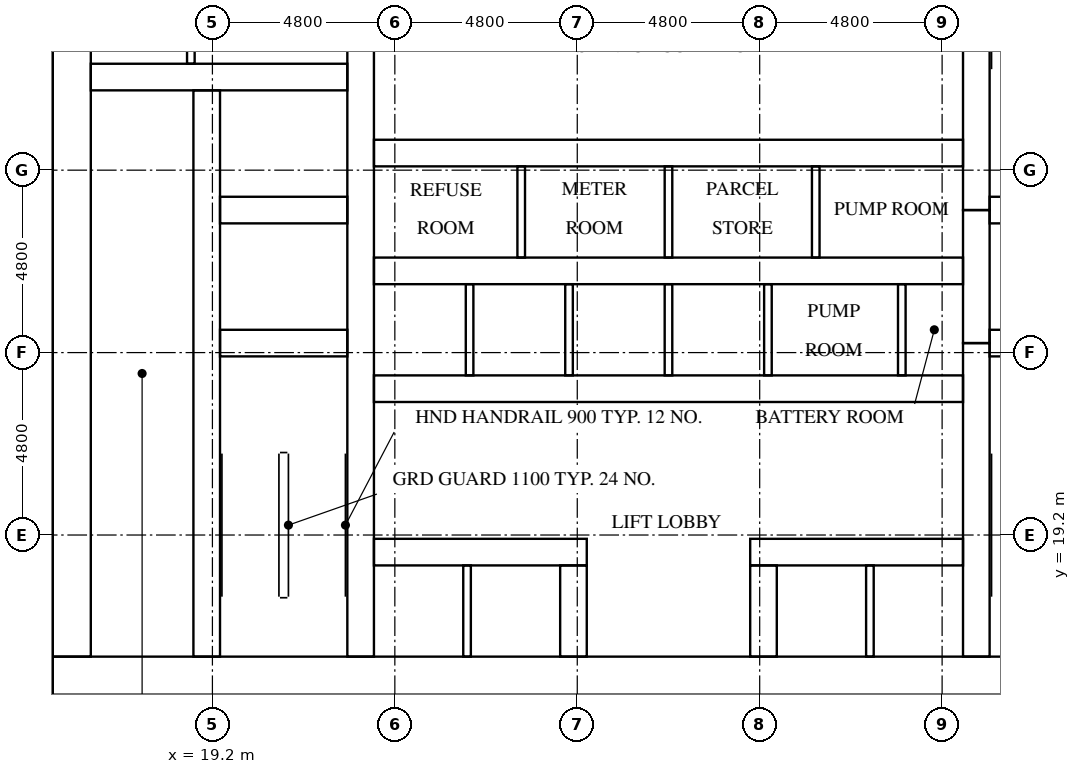
"""IFC4 building model, lengths in metres.
Left out: names, types, materials, properties, quantities, classifications, styles, units other than length and angle.
Written with IfcOpenShell. Run it as: python <this file> out.ifc"""

import sys

from ifc_helpers import new_model, si_unit, direction, frame, frame_2d, origin, place, context, subcontext, project, spatial, rectangle, extrude, element, fill, save


model = new_model("IFC4")
c1 = context("Model", 3, precision=1e-05, world=origin(), true_north=direction((0.0, 1.0)))
c2 = subcontext(c1, "Body", "Model", "MODEL_VIEW")
j1 = project(units=[si_unit("LENGTHUNIT", "METRE"), si_unit("PLANEANGLEUNIT", "RADIAN")], contexts=[c1])
p1 = place(None, origin())
s1 = spatial("IfcSite", under=j1, at=p1, CompositionType="ELEMENT")
p2 = place(p1, origin())
s2 = spatial("IfcBuilding", under=s1, at=p2, CompositionType="ELEMENT")
p3 = place(p2, frame((0.0, 0.0, 10.5)))
s3 = spatial("IfcBuildingStorey", under=s2, at=p3, CompositionType="ELEMENT", Elevation=10.5)
p4 = place(p3, frame((15.0, 15.5, 0.0), z_axis=(0.0, 0.0, 1.0), x_axis=(1.0, 0.0, 0.0)))
e1 = element("IfcWall", 1, at=p4, inside=s3, PredefinedType="SHEAR", context=c2, shape_type="SweptSolid", body=[
    extrude(rectangle(XDim=32.4, YDim=1.0, at=frame_2d((16.2, 0.0))), origin(), (0.0, 0.0, 1.0), 4.2),
])
p5 = place(p4, frame((15.3, 0.0, 0.0)))
e2 = element("IfcOpeningElement", 2, at=p5, cuts=e1, PredefinedType="OPENING", context=c2, shape_type="SweptSolid", body=[
    extrude(rectangle(XDim=1.8, YDim=2.1, at=frame_2d((0.9, 1.05))), frame((0.0, 0.51, 0.0), z_axis=(0.0, -1.0, 0.0), x_axis=(1.0, 0.0, 0.0)), (0.0, 0.0, 1.0), 1.02),
])
p6 = place(p3, frame((15.5, 16.0, 0.0), z_axis=(0.0, 0.0, 1.0), x_axis=(0.0, 1.0, 0.0)))
e3 = element("IfcWall", 3, at=p6, inside=s3, PredefinedType="SHEAR", context=c2, shape_type="SweptSolid", body=[
    extrude(rectangle(XDim=20.8, YDim=1.0, at=frame_2d((10.4, 0.0))), origin(), (0.0, 0.0, 1.0), 4.2),
])
p7 = place(p6, frame((4.76, 0.0, 0.0)))
e4 = element("IfcOpeningElement", 4, at=p7, cuts=e3, PredefinedType="OPENING", context=c2, shape_type="SweptSolid", body=[
    extrude(rectangle(XDim=1.2, YDim=2.1, at=frame_2d((0.6, 1.05))), frame((0.0, 0.51, 0.0), z_axis=(0.0, -1.0, 0.0), x_axis=(1.0, 0.0, 0.0)), (0.0, 0.0, 1.0), 1.02),
])
p8 = place(p3, frame((19.05, 16.0, 0.0), z_axis=(0.0, 0.0, 1.0), x_axis=(0.0, 1.0, 0.0)))
e5 = element("IfcWall", 5, at=p8, inside=s3, PredefinedType="SHEAR", context=c2, shape_type="SweptSolid", body=[
    extrude(rectangle(XDim=14.9, YDim=0.7, at=frame_2d((7.45, 0.0))), origin(), (0.0, 0.0, 1.0), 4.2),
])
p9 = place(p8, frame((9.45, 0.0, 0.0)))
e6 = element("IfcOpeningElement", 6, at=p9, cuts=e5, PredefinedType="OPENING", context=c2, shape_type="SweptSolid", body=[
    extrude(rectangle(XDim=1.1, YDim=2.1, at=frame_2d((0.55, 1.05))), frame((0.0, 0.36, 0.0), z_axis=(0.0, -1.0, 0.0), x_axis=(1.0, 0.0, 0.0)), (0.0, 0.0, 1.0), 0.72),
])
p10 = place(p8, frame((12.95, 0.0, 0.0)))
e7 = element("IfcOpeningElement", 7, at=p10, cuts=e5, PredefinedType="OPENING", context=c2, shape_type="SweptSolid", body=[
    extrude(rectangle(XDim=1.1, YDim=2.1, at=frame_2d((0.55, 1.05))), frame((0.0, 0.36, 0.0), z_axis=(0.0, -1.0, 0.0), x_axis=(1.0, 0.0, 0.0)), (0.0, 0.0, 1.0), 0.72),
])
p11 = place(p8, frame((0.2, 0.0, 0.0)))
e8 = element("IfcOpeningElement", 8, at=p11, cuts=e5, PredefinedType="OPENING", context=c2, shape_type="SweptSolid", body=[
    extrude(rectangle(XDim=1.2, YDim=2.1, at=frame_2d((0.6, 1.05))), frame((0.0, 0.36, 0.0), z_axis=(0.0, -1.0, 0.0), x_axis=(1.0, 0.0, 0.0)), (0.0, 0.0, 1.0), 0.72),
])
p12 = place(p3, frame((23.1, 16.0, 0.0), z_axis=(0.0, 0.0, 1.0), x_axis=(0.0, 1.0, 0.0)))
e9 = element("IfcWall", 9, at=p12, inside=s3, PredefinedType="SHEAR", context=c2, shape_type="SweptSolid", body=[
    extrude(rectangle(XDim=20.8, YDim=0.7, at=frame_2d((10.4, 0.0))), origin(), (0.0, 0.0, 1.0), 4.2),
])
p13 = place(p3, frame((39.3, 16.0, 0.0), z_axis=(0.0, 0.0, 1.0), x_axis=(0.0, 1.0, 0.0)))
e10 = element("IfcWall", 10, at=p13, inside=s3, PredefinedType="SHEAR", context=c2, shape_type="SweptSolid", body=[
    extrude(rectangle(XDim=8.25, YDim=0.7, at=frame_2d((4.125, 0.0))), origin(), (0.0, 0.0, 1.0), 4.2),
])
p14 = place(p3, frame((39.3, 24.25, 0.0), z_axis=(0.0, 0.0, 1.0), x_axis=(0.0, 1.0, 0.0)))
e11 = element("IfcWall", 11, at=p14, inside=s3, PredefinedType="SHEAR", context=c2, shape_type="SweptSolid", body=[
    extrude(rectangle(XDim=3.5, YDim=0.7, at=frame_2d((1.75, 0.0))), origin(), (0.0, 0.0, 1.0), 4.2),
])
p15 = place(p3, frame((39.3, 27.75, 0.0), z_axis=(0.0, 0.0, 1.0), x_axis=(0.0, 1.0, 0.0)))
e12 = element("IfcWall", 12, at=p15, inside=s3, PredefinedType="SHEAR", context=c2, shape_type="SweptSolid", body=[
    extrude(rectangle(XDim=9.05, YDim=0.7, at=frame_2d((4.525, 0.0))), origin(), (0.0, 0.0, 1.0), 4.2),
])
for number, where, z_axis, x_axis in (
    (13, (19.4, 24.25, 0.0), (0.0, 0.0, 1.0), (1.0, 0.0, 0.0)),
    (14, (19.4, 27.75, 0.0), (0.0, 0.0, 1.0), (1.0, 0.0, 0.0)),
):
    element("IfcWall", number, at=place(p3, frame(where, z_axis=z_axis, x_axis=x_axis)), inside=s3, PredefinedType="SHEAR", context=c2, shape_type="SweptSolid", body=[
        extrude(rectangle(XDim=3.35, YDim=0.7, at=frame_2d((1.675, 0.0))), origin(), (0.0, 0.0, 1.0), 4.2),
    ])
p16 = place(p3, frame((16.0, 31.25, 0.0), z_axis=(0.0, 0.0, 1.0), x_axis=(1.0, 0.0, 0.0)))
e15 = element("IfcWall", 15, at=p16, inside=s3, PredefinedType="SHEAR", context=c2, shape_type="SweptSolid", body=[
    extrude(rectangle(XDim=6.75, YDim=0.7, at=frame_2d((3.375, 0.0))), origin(), (0.0, 0.0, 1.0), 4.2),
])
for number, where, z_axis, x_axis in (
    (16, (39.65, 24.25, 0.0), (0.0, 0.0, 1.0), (1.0, 0.0, 0.0)),
    (17, (39.65, 27.75, 0.0), (0.0, 0.0, 1.0), (1.0, 0.0, 0.0)),
):
    element("IfcWall", number, at=place(p3, frame(where, z_axis=z_axis, x_axis=x_axis)), inside=s3, PredefinedType="SHEAR", context=c2, shape_type="SweptSolid", body=[
        extrude(rectangle(XDim=3.35, YDim=0.7, at=frame_2d((1.675, 0.0))), origin(), (0.0, 0.0, 1.0), 4.2),
    ])
p17 = place(p3, frame((23.45, 18.75, 0.0), z_axis=(0.0, 0.0, 1.0), x_axis=(1.0, 0.0, 0.0)))
e18 = element("IfcWall", 18, at=p17, inside=s3, PredefinedType="SHEAR", context=c2, shape_type="SweptSolid", body=[
    extrude(rectangle(XDim=5.6, YDim=0.7, at=frame_2d((2.8, 0.0))), origin(), (0.0, 0.0, 1.0), 4.2),
])
p18 = place(p17, frame((0.625, 0.0, 0.0)))
e19 = element("IfcOpeningElement", 19, at=p18, cuts=e18, PredefinedType="OPENING", context=c2, shape_type="SweptSolid", body=[
    extrude(rectangle(XDim=1.1, YDim=2.1, at=frame_2d((0.55, 1.05))), frame((0.0, 0.36, 0.0), z_axis=(0.0, -1.0, 0.0), x_axis=(1.0, 0.0, 0.0)), (0.0, 0.0, 1.0), 0.72),
])
p19 = place(p17, frame((3.175, 0.0, 0.0)))
e20 = element("IfcOpeningElement", 20, at=p19, cuts=e18, PredefinedType="OPENING", context=c2, shape_type="SweptSolid", body=[
    extrude(rectangle(XDim=1.1, YDim=2.1, at=frame_2d((0.55, 1.05))), frame((0.0, 0.36, 0.0), z_axis=(0.0, -1.0, 0.0), x_axis=(1.0, 0.0, 0.0)), (0.0, 0.0, 1.0), 0.72),
])
p20 = place(p3, frame((33.35, 18.75, 0.0), z_axis=(0.0, 0.0, 1.0), x_axis=(1.0, 0.0, 0.0)))
e21 = element("IfcWall", 21, at=p20, inside=s3, PredefinedType="SHEAR", context=c2, shape_type="SweptSolid", body=[
    extrude(rectangle(XDim=5.6, YDim=0.7, at=frame_2d((2.8, 0.0))), origin(), (0.0, 0.0, 1.0), 4.2),
])
p21 = place(p20, frame((1.325, 0.0, 0.0)))
e22 = element("IfcOpeningElement", 22, at=p21, cuts=e21, PredefinedType="OPENING", context=c2, shape_type="SweptSolid", body=[
    extrude(rectangle(XDim=1.1, YDim=2.1, at=frame_2d((0.55, 1.05))), frame((0.0, 0.36, 0.0), z_axis=(0.0, -1.0, 0.0), x_axis=(1.0, 0.0, 0.0)), (0.0, 0.0, 1.0), 0.72),
])
p22 = place(p20, frame((3.875, 0.0, 0.0)))
e23 = element("IfcOpeningElement", 23, at=p22, cuts=e21, PredefinedType="OPENING", context=c2, shape_type="SweptSolid", body=[
    extrude(rectangle(XDim=1.1, YDim=2.1, at=frame_2d((0.55, 1.05))), frame((0.0, 0.36, 0.0), z_axis=(0.0, -1.0, 0.0), x_axis=(1.0, 0.0, 0.0)), (0.0, 0.0, 1.0), 0.72),
])
p23 = place(p3, frame((23.45, 23.05, 0.0), z_axis=(0.0, 0.0, 1.0), x_axis=(1.0, 0.0, 0.0)))
e24 = element("IfcWall", 24, at=p23, inside=s3, PredefinedType="SHEAR", context=c2, shape_type="SweptSolid", body=[
    extrude(rectangle(XDim=15.5, YDim=0.7, at=frame_2d((7.75, 0.0))), origin(), (0.0, 0.0, 1.0), 4.2),
])
p24 = place(p23, frame((0.658, 0.0, 0.0)))
e25 = element("IfcOpeningElement", 25, at=p24, cuts=e24, PredefinedType="OPENING", context=c2, shape_type="SweptSolid", body=[
    extrude(rectangle(XDim=1.1, YDim=2.1, at=frame_2d((0.55, 1.05))), frame((0.0, 0.36, 0.0), z_axis=(0.0, -1.0, 0.0), x_axis=(1.0, 0.0, 0.0)), (0.0, 0.0, 1.0), 0.72),
])
p25 = place(p23, frame((3.275, 0.0, 0.0)))
e26 = element("IfcOpeningElement", 26, at=p25, cuts=e24, PredefinedType="OPENING", context=c2, shape_type="SweptSolid", body=[
    extrude(rectangle(XDim=1.1, YDim=2.1, at=frame_2d((0.55, 1.05))), frame((0.0, 0.36, 0.0), z_axis=(0.0, -1.0, 0.0), x_axis=(1.0, 0.0, 0.0)), (0.0, 0.0, 1.0), 0.72),
])
p26 = place(p23, frame((11.628, 0.0, 0.0)))
e27 = element("IfcOpeningElement", 27, at=p26, cuts=e24, PredefinedType="OPENING", context=c2, shape_type="SweptSolid", body=[
    extrude(rectangle(XDim=1.0, YDim=2.1, at=frame_2d((0.5, 1.05))), frame((0.0, 0.36, 0.0), z_axis=(0.0, -1.0, 0.0), x_axis=(1.0, 0.0, 0.0)), (0.0, 0.0, 1.0), 0.72),
])
p27 = place(p23, frame((14.245, 0.0, 0.0)))
e28 = element("IfcOpeningElement", 28, at=p27, cuts=e24, PredefinedType="OPENING", context=c2, shape_type="SweptSolid", body=[
    extrude(rectangle(XDim=1.0, YDim=2.1, at=frame_2d((0.5, 1.05))), frame((0.0, 0.36, 0.0), z_axis=(0.0, -1.0, 0.0), x_axis=(1.0, 0.0, 0.0)), (0.0, 0.0, 1.0), 0.72),
])
p28 = place(p3, frame((23.45, 26.15, 0.0), z_axis=(0.0, 0.0, 1.0), x_axis=(1.0, 0.0, 0.0)))
e29 = element("IfcWall", 29, at=p28, inside=s3, PredefinedType="SHEAR", context=c2, shape_type="SweptSolid", body=[
    extrude(rectangle(XDim=15.5, YDim=0.7, at=frame_2d((7.75, 0.0))), origin(), (0.0, 0.0, 1.0), 4.2),
])
p29 = place(p3, frame((23.45, 29.25, 0.0), z_axis=(0.0, 0.0, 1.0), x_axis=(1.0, 0.0, 0.0)))
e30 = element("IfcWall", 30, at=p29, inside=s3, PredefinedType="SHEAR", context=c2, shape_type="SweptSolid", body=[
    extrude(rectangle(XDim=15.5, YDim=0.7, at=frame_2d((7.75, 0.0))), origin(), (0.0, 0.0, 1.0), 4.2),
])
p30 = place(p29, frame((1.387, 0.0, 0.0)))
e31 = element("IfcOpeningElement", 31, at=p30, cuts=e30, PredefinedType="OPENING", context=c2, shape_type="SweptSolid", body=[
    extrude(rectangle(XDim=1.0, YDim=2.1, at=frame_2d((0.5, 1.05))), frame((0.0, 0.36, 0.0), z_axis=(0.0, -1.0, 0.0), x_axis=(1.0, 0.0, 0.0)), (0.0, 0.0, 1.0), 0.72),
])
p31 = place(p29, frame((5.312, 0.0, 0.0)))
e32 = element("IfcOpeningElement", 32, at=p31, cuts=e30, PredefinedType="OPENING", context=c2, shape_type="SweptSolid", body=[
    extrude(rectangle(XDim=1.0, YDim=2.1, at=frame_2d((0.5, 1.05))), frame((0.0, 0.36, 0.0), z_axis=(0.0, -1.0, 0.0), x_axis=(1.0, 0.0, 0.0)), (0.0, 0.0, 1.0), 0.72),
])
p32 = place(p29, frame((9.188, 0.0, 0.0)))
e33 = element("IfcOpeningElement", 33, at=p32, cuts=e30, PredefinedType="OPENING", context=c2, shape_type="SweptSolid", body=[
    extrude(rectangle(XDim=1.0, YDim=2.1, at=frame_2d((0.5, 1.05))), frame((0.0, 0.36, 0.0), z_axis=(0.0, -1.0, 0.0), x_axis=(1.0, 0.0, 0.0)), (0.0, 0.0, 1.0), 0.72),
])
p33 = place(p29, frame((13.113, 0.0, 0.0)))
e34 = element("IfcOpeningElement", 34, at=p33, cuts=e30, PredefinedType="OPENING", context=c2, shape_type="SweptSolid", body=[
    extrude(rectangle(XDim=1.0, YDim=2.1, at=frame_2d((0.5, 1.05))), frame((0.0, 0.36, 0.0), z_axis=(0.0, -1.0, 0.0), x_axis=(1.0, 0.0, 0.0)), (0.0, 0.0, 1.0), 0.72),
])
for number, where, z_axis, x_axis in (
    (35, (28.7, 16.0, 0.0), (0.0, 0.0, 1.0), (0.0, 1.0, 0.0)),
    (36, (33.7, 16.0, 0.0), (0.0, 0.0, 1.0), (0.0, 1.0, 0.0)),
):
    element("IfcWall", number, at=place(p3, frame(where, z_axis=z_axis, x_axis=x_axis)), inside=s3, PredefinedType="SHEAR", context=c2, shape_type="SweptSolid", body=[
        extrude(rectangle(XDim=2.4, YDim=0.7, at=frame_2d((1.2, 0.0))), origin(), (0.0, 0.0, 1.0), 4.2),
    ])
for number, where, z_axis, x_axis in (
    (37, (25.967, 23.4, 0.0), (0.0, 0.0, 1.0), (0.0, 1.0, 0.0)),
    (38, (28.583, 23.4, 0.0), (0.0, 0.0, 1.0), (0.0, 1.0, 0.0)),
    (39, (31.2, 23.4, 0.0), (0.0, 0.0, 1.0), (0.0, 1.0, 0.0)),
    (40, (33.817, 23.4, 0.0), (0.0, 0.0, 1.0), (0.0, 1.0, 0.0)),
):
    element("IfcWall", number, at=place(p3, frame(where, z_axis=z_axis, x_axis=x_axis)), inside=s3, PredefinedType="SOLIDWALL", context=c2, shape_type="SweptSolid", body=[
        extrude(rectangle(XDim=2.4, YDim=0.2, at=frame_2d((1.2, 0.0))), origin(), (0.0, 0.0, 1.0), 4.2),
    ])
for number, where, z_axis, x_axis in (
    (41, (25.9, 16.0, 0.0), (0.0, 0.0, 1.0), (0.0, 1.0, 0.0)),
    (42, (36.5, 16.0, 0.0), (0.0, 0.0, 1.0), (0.0, 1.0, 0.0)),
):
    element("IfcWall", number, at=place(p3, frame(where, z_axis=z_axis, x_axis=x_axis)), inside=s3, PredefinedType="SOLIDWALL", context=c2, shape_type="SweptSolid", body=[
        extrude(rectangle(XDim=2.4, YDim=0.2, at=frame_2d((1.2, 0.0))), origin(), (0.0, 0.0, 1.0), 4.2),
    ])
p34 = place(p3, frame((18.633, 31.6, 0.0), z_axis=(0.0, 0.0, 1.0), x_axis=(0.0, 1.0, 0.0)))
e43 = element("IfcWall", 43, at=p34, inside=s3, PredefinedType="PARTITIONING", context=c2, shape_type="SweptSolid", body=[
    extrude(rectangle(XDim=5.2, YDim=0.2, at=frame_2d((2.6, 0.0))), origin(), (0.0, 0.0, 1.0), 4.2),
])
p35 = place(p3, frame((37.339, 23.4, 0.0), z_axis=(0.0, 0.0, 1.0), x_axis=(0.0, 1.0, 0.0)))
e44 = element("IfcWall", 44, at=p35, inside=s3, PredefinedType="PARTITIONING", context=c2, shape_type="SweptSolid", body=[
    extrude(rectangle(XDim=2.4, YDim=0.2, at=frame_2d((1.2, 0.0))), origin(), (0.0, 0.0, 1.0), 4.2),
])
for number, where, z_axis, x_axis in (
    (45, (27.325, 26.5, 0.0), (0.0, 0.0, 1.0), (0.0, 1.0, 0.0)),
    (46, (31.2, 26.5, 0.0), (0.0, 0.0, 1.0), (0.0, 1.0, 0.0)),
    (47, (35.075, 26.5, 0.0), (0.0, 0.0, 1.0), (0.0, 1.0, 0.0)),
):
    element("IfcWall", number, at=place(p3, frame(where, z_axis=z_axis, x_axis=x_axis)), inside=s3, PredefinedType="PARTITIONING", context=c2, shape_type="SweptSolid", body=[
        extrude(rectangle(XDim=2.4, YDim=0.2, at=frame_2d((1.2, 0.0))), origin(), (0.0, 0.0, 1.0), 4.2),
    ])
p36 = place(p18, origin())
e48 = element("IfcDoor", 48, at=p36, inside=s3, OperationType="DOUBLE_DOOR_SLIDING", PredefinedType="DOOR", context=c2, shape_type="SweptSolid", body=[
    extrude(rectangle(XDim=1.1, YDim=2.1, at=frame_2d((0.55, 1.05))), frame((0.0, 0.025, 0.0), z_axis=(0.0, -1.0, 0.0), x_axis=(1.0, 0.0, 0.0)), (0.0, 0.0, 1.0), 0.05),
])
fill(e19, e48)
p37 = place(p19, origin())
e49 = element("IfcDoor", 49, at=p37, inside=s3, OperationType="DOUBLE_DOOR_SLIDING", PredefinedType="DOOR", context=c2, shape_type="SweptSolid", body=[
    extrude(rectangle(XDim=1.1, YDim=2.1, at=frame_2d((0.55, 1.05))), frame((0.0, 0.025, 0.0), z_axis=(0.0, -1.0, 0.0), x_axis=(1.0, 0.0, 0.0)), (0.0, 0.0, 1.0), 0.05),
])
fill(e20, e49)
p38 = place(p21, origin())
e50 = element("IfcDoor", 50, at=p38, inside=s3, OperationType="DOUBLE_DOOR_SLIDING", PredefinedType="DOOR", context=c2, shape_type="SweptSolid", body=[
    extrude(rectangle(XDim=1.1, YDim=2.1, at=frame_2d((0.55, 1.05))), frame((0.0, 0.025, 0.0), z_axis=(0.0, -1.0, 0.0), x_axis=(1.0, 0.0, 0.0)), (0.0, 0.0, 1.0), 0.05),
])
fill(e22, e50)
p39 = place(p22, origin())
e51 = element("IfcDoor", 51, at=p39, inside=s3, OperationType="DOUBLE_DOOR_SLIDING", PredefinedType="DOOR", context=c2, shape_type="SweptSolid", body=[
    extrude(rectangle(XDim=1.1, YDim=2.1, at=frame_2d((0.55, 1.05))), frame((0.0, 0.025, 0.0), z_axis=(0.0, -1.0, 0.0), x_axis=(1.0, 0.0, 0.0)), (0.0, 0.0, 1.0), 0.05),
])
fill(e23, e51)
p40 = place(p24, origin())
e52 = element("IfcDoor", 52, at=p40, inside=s3, OperationType="DOUBLE_DOOR_SLIDING", PredefinedType="DOOR", context=c2, shape_type="SweptSolid", body=[
    extrude(rectangle(XDim=1.1, YDim=2.1, at=frame_2d((0.55, 1.05))), frame((0.0, 0.025, 0.0), z_axis=(0.0, -1.0, 0.0), x_axis=(1.0, 0.0, 0.0)), (0.0, 0.0, 1.0), 0.05),
])
fill(e25, e52)
p41 = place(p25, origin())
e53 = element("IfcDoor", 53, at=p41, inside=s3, OperationType="DOUBLE_DOOR_SLIDING", PredefinedType="DOOR", context=c2, shape_type="SweptSolid", body=[
    extrude(rectangle(XDim=1.1, YDim=2.1, at=frame_2d((0.55, 1.05))), frame((0.0, 0.025, 0.0), z_axis=(0.0, -1.0, 0.0), x_axis=(1.0, 0.0, 0.0)), (0.0, 0.0, 1.0), 0.05),
])
fill(e26, e53)
p42 = place(p9, origin())
e54 = element("IfcDoor", 54, at=p42, inside=s3, OperationType="DOUBLE_DOOR_SLIDING", PredefinedType="DOOR", context=c2, shape_type="SweptSolid", body=[
    extrude(rectangle(XDim=1.1, YDim=2.1, at=frame_2d((0.55, 1.05))), frame((0.0, 0.025, 0.0), z_axis=(0.0, -1.0, 0.0), x_axis=(1.0, 0.0, 0.0)), (0.0, 0.0, 1.0), 0.05),
])
fill(e6, e54)
p43 = place(p10, origin())
e55 = element("IfcDoor", 55, at=p43, inside=s3, OperationType="DOUBLE_DOOR_SLIDING", PredefinedType="DOOR", context=c2, shape_type="SweptSolid", body=[
    extrude(rectangle(XDim=1.1, YDim=2.1, at=frame_2d((0.55, 1.05))), frame((0.0, 0.025, 0.0), z_axis=(0.0, -1.0, 0.0), x_axis=(1.0, 0.0, 0.0)), (0.0, 0.0, 1.0), 0.05),
])
fill(e7, e55)
p44 = place(p11, frame((1.2, 0.0, 0.0), z_axis=(0.0, 0.0, 1.0), x_axis=(-1.0, 0.0, 0.0)))
e56 = element("IfcDoor", 56, at=p44, inside=s3, OperationType="SINGLE_SWING_RIGHT", PredefinedType="DOOR", context=c2, shape_type="SweptSolid", body=[
    extrude(rectangle(XDim=1.2, YDim=2.1, at=frame_2d((0.6, 1.05))), frame((0.0, 0.025, 0.0), z_axis=(0.0, -1.0, 0.0), x_axis=(1.0, 0.0, 0.0)), (0.0, 0.0, 1.0), 0.05),
])
fill(e8, e56)
p45 = place(p5, frame((1.8, 0.0, 0.0), z_axis=(0.0, 0.0, 1.0), x_axis=(-1.0, 0.0, 0.0)))
e57 = element("IfcDoor", 57, at=p45, inside=s3, OperationType="DOUBLE_DOOR_SINGLE_SWING", PredefinedType="DOOR", context=c2, shape_type="SweptSolid", body=[
    extrude(rectangle(XDim=1.8, YDim=2.1, at=frame_2d((0.9, 1.05))), frame((0.0, 0.025, 0.0), z_axis=(0.0, -1.0, 0.0), x_axis=(1.0, 0.0, 0.0)), (0.0, 0.0, 1.0), 0.05),
])
fill(e2, e57)
p46 = place(p7, frame((1.2, 0.0, 0.0), z_axis=(0.0, 0.0, 1.0), x_axis=(-1.0, 0.0, 0.0)))
e58 = element("IfcDoor", 58, at=p46, inside=s3, OperationType="SINGLE_SWING_LEFT", PredefinedType="DOOR", context=c2, shape_type="SweptSolid", body=[
    extrude(rectangle(XDim=1.2, YDim=2.1, at=frame_2d((0.6, 1.05))), frame((0.0, 0.025, 0.0), z_axis=(0.0, -1.0, 0.0), x_axis=(1.0, 0.0, 0.0)), (0.0, 0.0, 1.0), 0.05),
])
fill(e4, e58)
p47 = place(p26, frame((1.0, 0.0, 0.0), z_axis=(0.0, 0.0, 1.0), x_axis=(-1.0, 0.0, 0.0)))
e59 = element("IfcDoor", 59, at=p47, inside=s3, OperationType="SINGLE_SWING_LEFT", PredefinedType="DOOR", context=c2, shape_type="SweptSolid", body=[
    extrude(rectangle(XDim=1.0, YDim=2.1, at=frame_2d((0.5, 1.05))), frame((0.0, 0.025, 0.0), z_axis=(0.0, -1.0, 0.0), x_axis=(1.0, 0.0, 0.0)), (0.0, 0.0, 1.0), 0.05),
])
fill(e27, e59)
p48 = place(p27, frame((1.0, 0.0, 0.0), z_axis=(0.0, 0.0, 1.0), x_axis=(-1.0, 0.0, 0.0)))
e60 = element("IfcDoor", 60, at=p48, inside=s3, OperationType="SINGLE_SWING_RIGHT", PredefinedType="DOOR", context=c2, shape_type="SweptSolid", body=[
    extrude(rectangle(XDim=1.0, YDim=2.1, at=frame_2d((0.5, 1.05))), frame((0.0, 0.025, 0.0), z_axis=(0.0, -1.0, 0.0), x_axis=(1.0, 0.0, 0.0)), (0.0, 0.0, 1.0), 0.05),
])
fill(e28, e60)
p49 = place(p30, origin())
e61 = element("IfcDoor", 61, at=p49, inside=s3, OperationType="SINGLE_SWING_LEFT", PredefinedType="DOOR", context=c2, shape_type="SweptSolid", body=[
    extrude(rectangle(XDim=1.0, YDim=2.1, at=frame_2d((0.5, 1.05))), frame((0.0, 0.025, 0.0), z_axis=(0.0, -1.0, 0.0), x_axis=(1.0, 0.0, 0.0)), (0.0, 0.0, 1.0), 0.05),
])
fill(e31, e61)
p50 = place(p31, origin())
e62 = element("IfcDoor", 62, at=p50, inside=s3, OperationType="SINGLE_SWING_RIGHT", PredefinedType="DOOR", context=c2, shape_type="SweptSolid", body=[
    extrude(rectangle(XDim=1.0, YDim=2.1, at=frame_2d((0.5, 1.05))), frame((0.0, 0.025, 0.0), z_axis=(0.0, -1.0, 0.0), x_axis=(1.0, 0.0, 0.0)), (0.0, 0.0, 1.0), 0.05),
])
fill(e32, e62)
p51 = place(p32, origin())
e63 = element("IfcDoor", 63, at=p51, inside=s3, OperationType="SINGLE_SWING_LEFT", PredefinedType="DOOR", context=c2, shape_type="SweptSolid", body=[
    extrude(rectangle(XDim=1.0, YDim=2.1, at=frame_2d((0.5, 1.05))), frame((0.0, 0.025, 0.0), z_axis=(0.0, -1.0, 0.0), x_axis=(1.0, 0.0, 0.0)), (0.0, 0.0, 1.0), 0.05),
])
fill(e33, e63)
p52 = place(p33, origin())
e64 = element("IfcDoor", 64, at=p52, inside=s3, OperationType="SINGLE_SWING_RIGHT", PredefinedType="DOOR", context=c2, shape_type="SweptSolid", body=[
    extrude(rectangle(XDim=1.0, YDim=2.1, at=frame_2d((0.5, 1.05))), frame((0.0, 0.025, 0.0), z_axis=(0.0, -1.0, 0.0), x_axis=(1.0, 0.0, 0.0)), (0.0, 0.0, 1.0), 0.05),
])
fill(e34, e64)
save(model, sys.argv[1])
